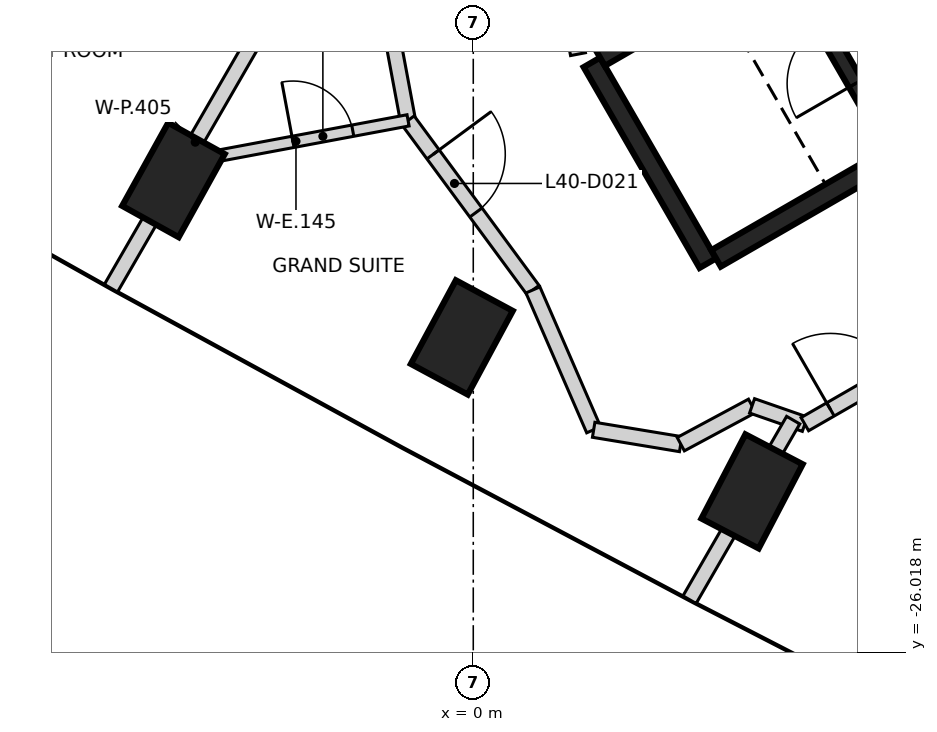
"""IFC4 building model, lengths in metres.
Left out: names, types, materials, properties, quantities, classifications, styles, units other than length and angle.
Written with IfcOpenShell. Run it as: python <this file> out.ifc"""

import sys

from ifc_helpers import new_model, si_unit, direction, frame, frame_2d, origin, origin_2d, place, context, subcontext, project, spatial, rectangle, extrude, element, fill, save


model = new_model("IFC4")
c1 = context("Model", 3, precision=1e-05, world=origin(), true_north=direction((0.0, 1.0)))
c2 = subcontext(c1, "Body", "Model", "MODEL_VIEW")
j1 = project(units=[si_unit("LENGTHUNIT", "METRE"), si_unit("PLANEANGLEUNIT", "RADIAN")], contexts=[c1])
p1 = place(None, origin())
s1 = spatial("IfcSite", under=j1, at=p1, CompositionType="ELEMENT")
p2 = place(p1, origin())
s2 = spatial("IfcBuilding", under=s1, at=p2, CompositionType="ELEMENT")
p3 = place(p2, frame((0.0, 0.0, 161.2)))
s3 = spatial("IfcBuildingStorey", under=s2, at=p3, CompositionType="ELEMENT", Elevation=161.2)
for number, where, z_axis, x_axis in (
    (1, (-3.945, -19.8, -0.4), (0.0, 0.0, 1.0), (0.485, 0.875, 0.0)),
    (2, (-0.151, -21.871, -0.4), (0.0, 0.0, 1.0), (0.474, 0.881, 0.0)),
    (3, (3.667, -23.896, -0.4), (0.0, 0.0, 1.0), (0.463, 0.886, 0.0)),
):
    element("IfcColumn", number, at=place(p3, frame(where, z_axis=z_axis, x_axis=x_axis)), inside=s3, PredefinedType="COLUMN", context=c2, shape_type="SweptSolid", body=[
        extrude(rectangle(XDim=1.25, YDim=0.85, at=origin_2d()), origin(), (0.0, 0.0, 1.0), 2.884),
    ])
p4 = place(p3, frame((3.085, -20.894, 0.0), z_axis=(0.0, 0.0, 1.0), x_axis=(-0.499978833458, 0.866037623948, 0.0)))
e4 = element("IfcWall", 4, at=p4, inside=s3, PredefinedType="SHEAR", context=c2, shape_type="SweptSolid", body=[
    extrude(rectangle(XDim=3.05, YDim=0.25, at=frame_2d((1.525, 0.0))), origin(), (0.0, 0.0, 1.0), 3.2),
])
p5 = place(p3, frame((1.669, -18.19, 0.0), z_axis=(0.0, 0.0, 1.0), x_axis=(0.866042235819, 0.499970844928, 0.0)))
e5 = element("IfcWall", 5, at=p5, inside=s3, PredefinedType="SHEAR", context=c2, shape_type="SweptSolid", body=[
    extrude(rectangle(XDim=2.865, YDim=0.25, at=frame_2d((1.432, 0.0))), origin(), (0.0, 0.0, 1.0), 3.2),
])
p6 = place(p3, frame((5.675, -19.399, 0.0), z_axis=(0.0, 0.0, 1.0), x_axis=(-0.866026637627, -0.499997862916, 0.0)))
e6 = element("IfcWall", 6, at=p6, inside=s3, PredefinedType="SHEAR", context=c2, shape_type="SweptSolid", body=[
    extrude(rectangle(XDim=2.865, YDim=0.25, at=frame_2d((1.432, 0.0))), origin(), (0.0, 0.0, 1.0), 3.2),
])
p7 = place(p3, frame((4.414, -16.276, 0.0), z_axis=(0.0, 0.0, 1.0), x_axis=(0.500003324108, -0.866023484601, 0.0)))
e7 = element("IfcWall", 7, at=p7, inside=s3, PredefinedType="SHEAR", context=c2, shape_type="SweptSolid", body=[
    extrude(rectangle(XDim=3.085, YDim=0.25, at=frame_2d((1.542, 0.0))), origin(), (0.0, 0.0, 1.0), 3.2),
])
p8 = place(p3, frame((5.503, -19.352, 0.0), z_axis=(0.0, 0.0, 1.0), x_axis=(-0.499986818241, 0.866033014143, 0.0)))
e8 = element("IfcWall", 8, at=p8, inside=s3, PredefinedType="SHEAR", context=c2, shape_type="SweptSolid", body=[
    extrude(rectangle(XDim=2.798, YDim=0.2, at=frame_2d((1.399, 0.0))), origin(), (0.0, 0.0, 1.0), 3.2),
])
p9 = place(p8, frame((0.949, 0.0, 0.0)))
e9 = element("IfcOpeningElement", 9, at=p9, cuts=e8, PredefinedType="OPENING", context=c2, shape_type="SweptSolid", body=[
    extrude(rectangle(XDim=0.9, YDim=2.1, at=frame_2d((0.45, 1.05))), frame((0.0, 0.11, 0.0), z_axis=(0.0, -1.0, 0.0), x_axis=(1.0, 0.0, 0.0)), (0.0, 0.0, 1.0), 0.22),
])
p10 = place(p3, frame((-1.212, -17.131, 0.0), z_axis=(0.0, 0.0, 1.0), x_axis=(0.183680924698, -0.982985919483, 0.0)))
e10 = element("IfcWall", 10, at=p10, inside=s3, PredefinedType="PARTITIONING", context=c2, shape_type="SweptSolid", body=[
    extrude(rectangle(XDim=1.917, YDim=0.2, at=frame_2d((0.958, 0.0))), origin(), (0.0, 0.0, 1.0), 3.2),
])
p11 = place(p3, frame((-0.858, -19.016, 0.0), z_axis=(0.0, 0.0, 1.0), x_axis=(0.593123867414, -0.805111220829, 0.0)))
e11 = element("IfcWall", 11, at=p11, inside=s3, PredefinedType="PARTITIONING", context=c2, shape_type="SweptSolid", body=[
    extrude(rectangle(XDim=2.77, YDim=0.2, at=frame_2d((1.385, 0.0))), origin(), (0.0, 0.0, 1.0), 3.2),
])
p12 = place(p11, frame((0.555, 0.0, 0.0)))
e12 = element("IfcOpeningElement", 12, at=p12, cuts=e11, PredefinedType="OPENING", context=c2, shape_type="SweptSolid", body=[
    extrude(rectangle(XDim=0.95, YDim=2.1, at=frame_2d((0.475, 1.05))), frame((0.0, 0.11, 0.0), z_axis=(0.0, -1.0, 0.0), x_axis=(1.0, 0.0, 0.0)), (0.0, 0.0, 1.0), 0.22),
])
p13 = place(p3, frame((0.289, -12.445, 0.0), z_axis=(0.0, 0.0, 1.0), x_axis=(0.187668946952, -0.982232338273, 0.0)))
e13 = element("IfcWall", 13, at=p13, inside=s3, PredefinedType="PARTITIONING", context=c2, shape_type="SweptSolid", body=[
    extrude(rectangle(XDim=5.802, YDim=0.2, at=frame_2d((2.901, 0.0))), origin(), (0.0, 0.0, 1.0), 3.2),
])
p14 = place(p13, frame((2.433, 0.0, 0.0)))
e14 = element("IfcOpeningElement", 14, at=p14, cuts=e13, PredefinedType="OPENING", context=c2, shape_type="SweptSolid", body=[
    extrude(rectangle(XDim=1.0, YDim=2.1, at=frame_2d((0.5, 1.05))), frame((0.0, 0.11, 0.0), z_axis=(0.0, -1.0, 0.0), x_axis=(1.0, 0.0, 0.0)), (0.0, 0.0, 1.0), 0.22),
])
p15 = place(p3, frame((0.785, -21.246, 0.0), z_axis=(0.0, 0.0, 1.0), x_axis=(0.398365586627, -0.917226721913, 0.0)))
e15 = element("IfcWall", 15, at=p15, inside=s3, PredefinedType="PARTITIONING", context=c2, shape_type="SweptSolid", body=[
    extrude(rectangle(XDim=2.006, YDim=0.2, at=frame_2d((1.003, 0.0))), origin(), (0.0, 0.0, 1.0), 2.484),
])
p16 = place(p3, frame((1.584, -23.086, 0.0), z_axis=(0.0, 0.0, 1.0), x_axis=(0.986654221629, -0.162829502674, 0.0)))
e16 = element("IfcWall", 16, at=p16, inside=s3, PredefinedType="PARTITIONING", context=c2, shape_type="SweptSolid", body=[
    extrude(rectangle(XDim=1.16, YDim=0.2, at=frame_2d((0.58, 0.0))), origin(), (0.0, 0.0, 1.0), 2.484),
])
p17 = place(p3, frame((2.73, -23.275, 0.0), z_axis=(0.0, 0.0, 1.0), x_axis=(0.880927165636, 0.473251866182, 0.0)))
e17 = element("IfcWall", 17, at=p17, inside=s3, PredefinedType="PARTITIONING", context=c2, shape_type="SweptSolid", body=[
    extrude(rectangle(XDim=1.065, YDim=0.2, at=frame_2d((0.532, 0.0))), origin(), (0.0, 0.0, 1.0), 3.2),
])
p18 = place(p3, frame((3.668, -22.771, 0.0), z_axis=(0.0, 0.0, 1.0), x_axis=(0.944447470761, -0.328662402738, 0.0)))
e18 = element("IfcWall", 18, at=p18, inside=s3, PredefinedType="PARTITIONING", context=c2, shape_type="SweptSolid", body=[
    extrude(rectangle(XDim=0.735, YDim=0.2, at=frame_2d((0.367, 0.0))), origin(), (0.0, 0.0, 1.0), 3.2),
])
p19 = place(p3, frame((4.362, -23.012, 0.0), z_axis=(0.0, 0.0, 1.0), x_axis=(0.866692617793, 0.49884256661, 0.0)))
e19 = element("IfcWall", 19, at=p19, inside=s3, PredefinedType="PARTITIONING", context=c2, shape_type="SweptSolid", body=[
    extrude(rectangle(XDim=1.778, YDim=0.2, at=frame_2d((0.889, 0.0))), origin(), (0.0, 0.0, 1.0), 3.2),
])
p20 = place(p19, frame((0.389, 0.0, 0.0)))
e20 = element("IfcOpeningElement", 20, at=p20, cuts=e19, PredefinedType="OPENING", context=c2, shape_type="SweptSolid", body=[
    extrude(rectangle(XDim=1.0, YDim=2.1, at=frame_2d((0.5, 1.05))), frame((0.0, 0.11, 0.0), z_axis=(0.0, -1.0, 0.0), x_axis=(1.0, 0.0, 0.0)), (0.0, 0.0, 1.0), 0.22),
])
p21 = place(p3, frame((-8.535, -19.107, 0.0), z_axis=(0.0, 0.0, 1.0), x_axis=(0.499987057201, 0.866032876184, 0.0)))
e21 = element("IfcWall", 21, at=p21, inside=s3, PredefinedType="PARTITIONING", context=c2, shape_type="SweptSolid", body=[
    extrude(rectangle(XDim=10.809, YDim=0.2, at=frame_2d((5.404, 0.0))), origin(), (0.0, 0.0, 1.0), 3.2),
])
p22 = place(p3, frame((-4.767, -21.223, 0.0), z_axis=(0.0, 0.0, 1.0), x_axis=(0.49992092869, 0.866071050814, 0.0)))
e22 = element("IfcWall", 22, at=p22, inside=s3, PredefinedType="PARTITIONING", context=c2, shape_type="SweptSolid", body=[
    extrude(rectangle(XDim=4.437, YDim=0.2, at=frame_2d((2.218, 0.0))), origin(), (0.0, 0.0, 1.0), 3.2),
])
p23 = place(p3, frame((2.845, -25.321, 0.0), z_axis=(0.0, 0.0, 1.0), x_axis=(0.499942002849, 0.866058885866, 0.0)))
e23 = element("IfcWall", 23, at=p23, inside=s3, PredefinedType="PARTITIONING", context=c2, shape_type="SweptSolid", body=[
    extrude(rectangle(XDim=2.727, YDim=0.2, at=frame_2d((1.364, 0.0))), origin(), (0.0, 0.0, 1.0), 3.2),
])
p24 = place(p3, frame((-3.807, -19.566, 0.0), z_axis=(0.0, 0.0, 1.0), x_axis=(0.982987155193, 0.183674311555, 0.0)))
e24 = element("IfcWall", 24, at=p24, inside=s3, PredefinedType="PARTITIONING", context=c2, shape_type="SweptSolid", body=[
    extrude(rectangle(XDim=3.0, YDim=0.15, at=frame_2d((1.5, 0.0))), origin(), (0.0, 0.0, 1.0), 3.2),
])
p25 = place(p24, frame((1.46, 0.0, 0.0)))
e25 = element("IfcOpeningElement", 25, at=p25, cuts=e24, PredefinedType="OPENING", context=c2, shape_type="SweptSolid", body=[
    extrude(rectangle(XDim=0.8, YDim=2.1, at=frame_2d((0.4, 1.05))), frame((0.0, 0.085, 0.0), z_axis=(0.0, -1.0, 0.0), x_axis=(1.0, 0.0, 0.0)), (0.0, 0.0, 1.0), 0.17),
])
p26 = place(p9, origin())
e26 = element("IfcDoor", 26, at=p26, inside=s3, OperationType="SINGLE_SWING_LEFT", PredefinedType="DOOR", context=c2, shape_type="SweptSolid", body=[
    extrude(rectangle(XDim=0.9, YDim=2.1, at=frame_2d((0.45, 1.05))), frame((0.0, 0.025, 0.0), z_axis=(0.0, -1.0, 0.0), x_axis=(1.0, 0.0, 0.0)), (0.0, 0.0, 1.0), 0.05),
])
fill(e9, e26)
p27 = place(p12, frame((0.95, 0.0, 0.0), z_axis=(0.0, 0.0, 1.0), x_axis=(-1.0, 0.0, 0.0)))
e27 = element("IfcDoor", 27, at=p27, inside=s3, OperationType="SINGLE_SWING_LEFT", PredefinedType="DOOR", context=c2, shape_type="SweptSolid", body=[
    extrude(rectangle(XDim=0.95, YDim=2.1, at=frame_2d((0.475, 1.05))), frame((0.0, 0.025, 0.0), z_axis=(0.0, -1.0, 0.0), x_axis=(1.0, 0.0, 0.0)), (0.0, 0.0, 1.0), 0.05),
])
fill(e12, e27)
p28 = place(p25, frame((0.8, 0.0, 0.0), z_axis=(0.0, 0.0, 1.0), x_axis=(-1.0, 0.0, 0.0)))
e28 = element("IfcDoor", 28, at=p28, inside=s3, OperationType="SINGLE_SWING_LEFT", PredefinedType="DOOR", context=c2, shape_type="SweptSolid", body=[
    extrude(rectangle(XDim=0.8, YDim=2.1, at=frame_2d((0.4, 1.05))), frame((0.0, 0.025, 0.0), z_axis=(0.0, -1.0, 0.0), x_axis=(1.0, 0.0, 0.0)), (0.0, 0.0, 1.0), 0.05),
])
fill(e25, e28)
p29 = place(p20, frame((1.0, 0.0, 0.0), z_axis=(0.0, 0.0, 1.0), x_axis=(-1.0, 0.0, 0.0)))
e29 = element("IfcDoor", 29, at=p29, inside=s3, OperationType="SINGLE_SWING_LEFT", PredefinedType="DOOR", context=c2, shape_type="SweptSolid", body=[
    extrude(rectangle(XDim=1.0, YDim=2.1, at=frame_2d((0.5, 1.05))), frame((0.0, 0.025, 0.0), z_axis=(0.0, -1.0, 0.0), x_axis=(1.0, 0.0, 0.0)), (0.0, 0.0, 1.0), 0.05),
])
fill(e20, e29)
save(model, sys.argv[1])
